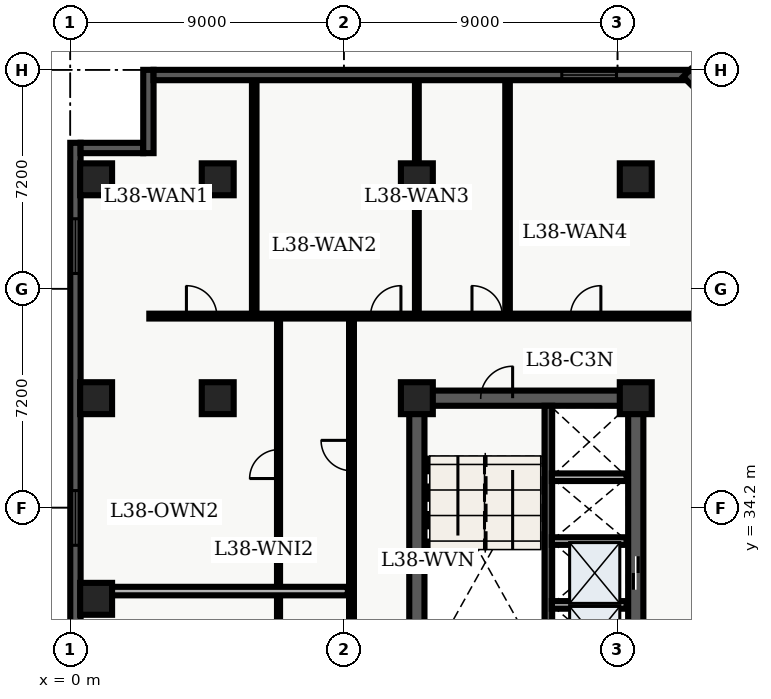
"""IFC4 building model, lengths in metres.
Left out: names, types, materials, properties, quantities, classifications, styles, units other than length and angle.
Written with IfcOpenShell. Run it as: python <this file> out.ifc"""

import sys

from ifc_helpers import new_model, entity, si_unit, converted_unit, direction, frame, origin_with_axes, origin_2d_with_axis, place, context, subcontext, project, spatial, polyline, rectangle, outline, extrude, element, fill, save


model = new_model("IFC4")
c1 = context("Model", 3, precision=1e-05, world=origin_with_axes(), true_north=direction((0.0, 1.0)))
c2 = subcontext(c1, "Body", "Model", "MODEL_VIEW")
j1 = project(units=[si_unit("LENGTHUNIT", "METRE"), converted_unit("PLANEANGLEUNIT", "DEGREE", entity("IfcPlaneAngleMeasure", 0.017), si_unit("PLANEANGLEUNIT", "RADIAN"), dimensions=[0, 0, 0, 0, 0, 0, 0])], contexts=[c1])
p1 = place(None, origin_with_axes())
s1 = spatial("IfcSite", under=j1, at=p1, CompositionType="ELEMENT")
p2 = place(p1, origin_with_axes())
s2 = spatial("IfcBuilding", under=s1, at=p2, CompositionType="ELEMENT")
p3 = place(p2, frame((0.0, 0.0, 156.3), z_axis=(0.0, 0.0, 1.0), x_axis=(1.0, 0.0, 0.0)))
s3 = spatial("IfcBuildingStorey", under=s2, at=p3, CompositionType="ELEMENT", Elevation=156.3)
p4 = place(p3, frame((11.4, 10.8, 0.0), z_axis=(0.0, 0.0, 1.0), x_axis=(0.0, 1.0, 0.0)))
e1 = element("IfcWall", 1, at=p4, inside=s3, PredefinedType="SHEAR", context=c2, shape_type="SweptSolid", body=[
    extrude(outline(polyline([(0.0, -0.25), (27.0, -0.25), (27.0, 0.25), (0.0, 0.25), (0.0, -0.25)])), origin_with_axes(), (0.0, 0.0, 1.0), 3.66),
])
p5 = place(p3, frame((11.4, 37.8, 0.0), z_axis=(0.0, 0.0, 1.0), x_axis=(1.0, 0.0, 0.0)))
e2 = element("IfcWall", 2, at=p5, inside=s3, PredefinedType="SHEAR", context=c2, shape_type="SweptSolid", body=[
    extrude(outline(polyline([(0.0, -0.25), (7.2, -0.25), (7.2, 0.25), (0.0, 0.25), (0.0, -0.25)])), origin_with_axes(), (0.0, 0.0, 1.0), 3.66),
])
p6 = place(p5, frame((2.625, 0.0, 0.0), z_axis=(0.0, 0.0, 1.0), x_axis=(1.0, 0.0, 0.0)))
e3 = element("IfcOpeningElement", 3, at=p6, cuts=e2, PredefinedType="OPENING", context=c2, shape_type="SweptSolid", body=[
    extrude(rectangle(XDim=1.05, YDim=0.52, at=origin_2d_with_axis()), origin_with_axes(), (0.0, 0.0, 1.0), 2.15),
])
p7 = place(p3, frame((18.6, 24.3, 0.0), z_axis=(0.0, 0.0, 1.0), x_axis=(0.0, 1.0, 0.0)))
e4 = element("IfcWall", 4, at=p7, inside=s3, PredefinedType="SHEAR", context=c2, shape_type="SweptSolid", body=[
    extrude(outline(polyline([(0.0, -0.25), (13.5, -0.25), (13.5, 0.25), (0.0, 0.25), (0.0, -0.25)])), origin_with_axes(), (0.0, 0.0, 1.0), 3.66),
])
p8 = place(p7, frame((5.65, 0.0, 0.0), z_axis=(0.0, 0.0, 1.0), x_axis=(1.0, 0.0, 0.0)))
e5 = element("IfcOpeningElement", 5, at=p8, cuts=e4, PredefinedType="OPENING", context=c2, shape_type="SweptSolid", body=[
    extrude(rectangle(XDim=1.1, YDim=0.52, at=origin_2d_with_axis()), origin_with_axes(), (0.0, 0.0, 1.0), 2.15),
])
p9 = place(p7, frame((7.75, 0.0, 0.0), z_axis=(0.0, 0.0, 1.0), x_axis=(1.0, 0.0, 0.0)))
e6 = element("IfcOpeningElement", 6, at=p9, cuts=e4, PredefinedType="OPENING", context=c2, shape_type="SweptSolid", body=[
    extrude(rectangle(XDim=1.1, YDim=0.52, at=origin_2d_with_axis()), origin_with_axes(), (0.0, 0.0, 1.0), 2.15),
])
p10 = place(p3, frame((15.725, 28.9, 0.0), z_axis=(0.0, 0.0, 1.0), x_axis=(0.0, 1.0, 0.0)))
e7 = element("IfcWall", 7, at=p10, inside=s3, PredefinedType="SHEAR", context=c2, shape_type="SweptSolid", body=[
    extrude(outline(polyline([(0.0, -0.125), (8.65, -0.125), (8.65, 0.125), (0.0, 0.125), (0.0, -0.125)])), origin_with_axes(), (0.0, 0.0, 1.0), 3.66),
])
for number, where, z_axis, x_axis in (
    (8, (11.4, 37.8, 0.0), (0.0, 0.0, 1.0), (1.0, 0.0, 0.0)),
    (9, (11.4, 45.0, 0.0), (0.0, 0.0, 1.0), (1.0, 0.0, 0.0)),
    (10, (18.6, 37.8, 0.0), (0.0, 0.0, 1.0), (1.0, 0.0, 0.0)),
    (11, (18.6, 45.0, 0.0), (0.0, 0.0, 1.0), (1.0, 0.0, 0.0)),
    (12, (4.85, 37.8, 0.0), (0.0, 0.0, 1.0), (1.0, 0.0, 0.0)),
    (13, (4.85, 45.0, 0.0), (0.0, 0.0, 1.0), (1.0, 0.0, 0.0)),
    (14, (0.85, 31.2, 0.0), (0.0, 0.0, 1.0), (1.0, 0.0, 0.0)),
    (15, (0.85, 37.8, 0.0), (0.0, 0.0, 1.0), (1.0, 0.0, 0.0)),
    (16, (0.85, 45.0, 0.0), (0.0, 0.0, 1.0), (1.0, 0.0, 0.0)),
):
    element("IfcColumn", number, at=place(p3, frame(where, z_axis=z_axis, x_axis=x_axis)), inside=s3, PredefinedType="COLUMN", context=c2, shape_type="SweptSolid", body=[
        extrude(rectangle(XDim=1.05, YDim=1.05, at=origin_2d_with_axis()), origin_with_axes(), (0.0, 0.0, 1.0), 3.9),
    ])
for number, where, z_axis, x_axis in (
    (17, (15.84, 31.0, 0.0), (0.0, 0.0, 1.0), (1.0, 0.0, 0.0)),
    (18, (15.84, 33.1, 0.0), (0.0, 0.0, 1.0), (1.0, 0.0, 0.0)),
    (19, (15.84, 35.2, 0.0), (0.0, 0.0, 1.0), (1.0, 0.0, 0.0)),
):
    element("IfcWall", number, at=place(p3, frame(where, z_axis=z_axis, x_axis=x_axis)), inside=s3, PredefinedType="SOLIDWALL", context=c2, shape_type="SweptSolid", body=[
        extrude(outline(polyline([(0.0, -0.125), (2.46, -0.125), (2.46, 0.125), (0.0, 0.125), (0.0, -0.125)])), origin_with_axes(), (0.0, 0.0, 1.0), 2.7),
    ])
p11 = place(p3, frame((2.6, 40.5, 0.0), z_axis=(0.0, 0.0, 1.0), x_axis=(1.0, 0.0, 0.0)))
e20 = element("IfcWall", 20, at=p11, inside=s3, PredefinedType="PARTITIONING", context=c2, shape_type="SweptSolid", body=[
    extrude(outline(polyline([(0.0, -0.08), (20.117, -0.08), (20.117, 0.08), (0.0, 0.08), (0.0, -0.08)])), origin_with_axes(), (0.0, 0.0, 1.0), 2.7),
])
p12 = place(p11, frame((1.72, 0.0, 0.0), z_axis=(0.0, 0.0, 1.0), x_axis=(1.0, 0.0, 0.0)))
e21 = element("IfcOpeningElement", 21, at=p12, cuts=e20, PredefinedType="OPENING", context=c2, shape_type="SweptSolid", body=[
    extrude(rectangle(XDim=1.0, YDim=0.18, at=origin_2d_with_axis()), origin_with_axes(), (0.0, 0.0, 1.0), 2.15),
])
p13 = place(p11, frame((7.776, 0.0, 0.0), z_axis=(0.0, 0.0, 1.0), x_axis=(1.0, 0.0, 0.0)))
e22 = element("IfcOpeningElement", 22, at=p13, cuts=e20, PredefinedType="OPENING", context=c2, shape_type="SweptSolid", body=[
    extrude(rectangle(XDim=1.0, YDim=0.18, at=origin_2d_with_axis()), origin_with_axes(), (0.0, 0.0, 1.0), 2.15),
])
p14 = place(p11, frame((11.113, 0.0, 0.0), z_axis=(0.0, 0.0, 1.0), x_axis=(1.0, 0.0, 0.0)))
e23 = element("IfcOpeningElement", 23, at=p14, cuts=e20, PredefinedType="OPENING", context=c2, shape_type="SweptSolid", body=[
    extrude(rectangle(XDim=1.0, YDim=0.18, at=origin_2d_with_axis()), origin_with_axes(), (0.0, 0.0, 1.0), 2.15),
])
p15 = place(p11, frame((14.352, 0.0, 0.0), z_axis=(0.0, 0.0, 1.0), x_axis=(1.0, 0.0, 0.0)))
e24 = element("IfcOpeningElement", 24, at=p15, cuts=e20, PredefinedType="OPENING", context=c2, shape_type="SweptSolid", body=[
    extrude(rectangle(XDim=1.0, YDim=0.18, at=origin_2d_with_axis()), origin_with_axes(), (0.0, 0.0, 1.0), 2.15),
])
p16 = place(p3, frame((9.25, 24.4, 0.0), z_axis=(0.0, 0.0, 1.0), x_axis=(0.0, 1.0, 0.0)))
e25 = element("IfcWall", 25, at=p16, inside=s3, PredefinedType="PARTITIONING", context=c2, shape_type="SweptSolid", body=[
    extrude(outline(polyline([(0.0, -0.08), (16.1, -0.08), (16.1, 0.08), (0.0, 0.08), (0.0, -0.08)])), origin_with_axes(), (0.0, 0.0, 1.0), 2.7),
])
p17 = place(p16, frame((3.567, 0.0, 0.0), z_axis=(0.0, 0.0, 1.0), x_axis=(1.0, 0.0, 0.0)))
e26 = element("IfcOpeningElement", 26, at=p17, cuts=e25, PredefinedType="OPENING", context=c2, shape_type="SweptSolid", body=[
    extrude(rectangle(XDim=1.0, YDim=0.18, at=origin_2d_with_axis()), origin_with_axes(), (0.0, 0.0, 1.0), 2.15),
])
p18 = place(p16, frame((11.512, 0.0, 0.0), z_axis=(0.0, 0.0, 1.0), x_axis=(1.0, 0.0, 0.0)))
e27 = element("IfcOpeningElement", 27, at=p18, cuts=e25, PredefinedType="OPENING", context=c2, shape_type="SweptSolid", body=[
    extrude(rectangle(XDim=1.0, YDim=0.18, at=origin_2d_with_axis()), origin_with_axes(), (0.0, 0.0, 1.0), 2.15),
])
p19 = place(p3, frame((6.85, 24.55, 0.0), z_axis=(0.0, 0.0, 1.0), x_axis=(0.0, 1.0, 0.0)))
e28 = element("IfcWall", 28, at=p19, inside=s3, PredefinedType="PARTITIONING", context=c2, shape_type="SweptSolid", body=[
    extrude(outline(polyline([(0.0, -0.05), (15.75, -0.05), (15.75, 0.05), (0.0, 0.05), (0.0, -0.05)])), origin_with_axes(), (0.0, 0.0, 1.0), 2.7),
])
p20 = place(p19, frame((3.417, 0.0, 0.0), z_axis=(0.0, 0.0, 1.0), x_axis=(1.0, 0.0, 0.0)))
e29 = element("IfcOpeningElement", 29, at=p20, cuts=e28, PredefinedType="OPENING", context=c2, shape_type="SweptSolid", body=[
    extrude(rectangle(XDim=0.95, YDim=0.12, at=origin_2d_with_axis()), origin_with_axes(), (0.0, 0.0, 1.0), 2.15),
])
p21 = place(p19, frame((11.082, 0.0, 0.0), z_axis=(0.0, 0.0, 1.0), x_axis=(1.0, 0.0, 0.0)))
e30 = element("IfcOpeningElement", 30, at=p21, cuts=e28, PredefinedType="OPENING", context=c2, shape_type="SweptSolid", body=[
    extrude(rectangle(XDim=0.95, YDim=0.12, at=origin_2d_with_axis()), origin_with_axes(), (0.0, 0.0, 1.0), 2.15),
])
p22 = place(p3, frame((0.335, 31.455, 0.0), z_axis=(0.0, 0.0, 1.0), x_axis=(1.0, 0.0, 0.0)))
e31 = element("IfcWall", 31, at=p22, inside=s3, PredefinedType="PARTITIONING", context=c2, shape_type="SweptSolid", body=[
    extrude(outline(polyline([(0.0, -0.14), (8.795, -0.14), (8.795, 0.14), (0.0, 0.14), (0.0, -0.14)])), origin_with_axes(), (0.0, 0.0, 1.0), 2.7),
])
p23 = place(p3, frame((6.051, 40.6, 0.0), z_axis=(0.0, 0.0, 1.0), x_axis=(0.0, 1.0, 0.0)))
e32 = element("IfcWall", 32, at=p23, inside=s3, PredefinedType="PARTITIONING", context=c2, shape_type="SweptSolid", body=[
    extrude(outline(polyline([(0.0, -0.075), (7.665, -0.075), (7.665, 0.075), (0.0, 0.075), (0.0, -0.075)])), origin_with_axes(), (0.0, 0.0, 1.0), 2.7),
])
p24 = place(p3, frame((11.4, 40.6, 0.0), z_axis=(0.0, 0.0, 1.0), x_axis=(0.0, 1.0, 0.0)))
e33 = element("IfcWall", 33, at=p24, inside=s3, PredefinedType="PARTITIONING", context=c2, shape_type="SweptSolid", body=[
    extrude(outline(polyline([(0.0, -0.062), (7.665, -0.062), (7.665, 0.062), (0.0, 0.062), (0.0, -0.062)])), origin_with_axes(), (0.0, 0.0, 1.0), 2.7),
])
p25 = place(p3, frame((14.383, 40.6, 0.0), z_axis=(0.0, 0.0, 1.0), x_axis=(0.0, 1.0, 0.0)))
e34 = element("IfcWall", 34, at=p25, inside=s3, PredefinedType="PARTITIONING", context=c2, shape_type="SweptSolid", body=[
    extrude(outline(polyline([(0.0, -0.075), (7.665, -0.075), (7.665, 0.075), (0.0, 0.075), (0.0, -0.075)])), origin_with_axes(), (0.0, 0.0, 1.0), 2.7),
])
p26 = place(p3, frame((0.17, 2.74, 0.0), z_axis=(0.0, 0.0, 1.0), x_axis=(0.0, 1.0, 0.0)))
e35 = element("IfcWall", 35, at=p26, inside=s3, PredefinedType="SOLIDWALL", context=c2, shape_type="SweptSolid", body=[
    extrude(outline(polyline([(0.0, -0.17), (43.46, -0.17), (43.46, 0.17), (0.0, 0.17), (0.0, -0.17)])), origin_with_axes(), (0.0, 0.0, 1.0), 3.66),
])
p27 = place(p26, frame((2.948, 0.0, 0.45), z_axis=(0.0, 0.0, 1.0), x_axis=(1.0, 0.0, 0.0)))
e36 = element("IfcOpeningElement", 36, at=p27, cuts=e35, PredefinedType="OPENING", context=c2, shape_type="SweptSolid", body=[
    extrude(rectangle(XDim=1.8, YDim=0.36, at=origin_2d_with_axis()), origin_with_axes(), (0.0, 0.0, 1.0), 2.1),
])
p28 = place(p26, frame((12.339, 0.0, 0.45), z_axis=(0.0, 0.0, 1.0), x_axis=(1.0, 0.0, 0.0)))
e37 = element("IfcOpeningElement", 37, at=p28, cuts=e35, PredefinedType="OPENING", context=c2, shape_type="SweptSolid", body=[
    extrude(rectangle(XDim=1.8, YDim=0.36, at=origin_2d_with_axis()), origin_with_axes(), (0.0, 0.0, 1.0), 2.1),
])
p29 = place(p26, frame((26.426, 0.0, 0.45), z_axis=(0.0, 0.0, 1.0), x_axis=(1.0, 0.0, 0.0)))
e38 = element("IfcOpeningElement", 38, at=p29, cuts=e35, PredefinedType="OPENING", context=c2, shape_type="SweptSolid", body=[
    extrude(rectangle(XDim=1.8, YDim=0.36, at=origin_2d_with_axis()), origin_with_axes(), (0.0, 0.0, 1.0), 2.1),
])
p30 = place(p26, frame((31.121, 0.0, 0.45), z_axis=(0.0, 0.0, 1.0), x_axis=(1.0, 0.0, 0.0)))
e39 = element("IfcOpeningElement", 39, at=p30, cuts=e35, PredefinedType="OPENING", context=c2, shape_type="SweptSolid", body=[
    extrude(rectangle(XDim=1.8, YDim=0.36, at=origin_2d_with_axis()), origin_with_axes(), (0.0, 0.0, 1.0), 2.1),
])
p31 = place(p26, frame((40.062, 0.0, 0.45), z_axis=(0.0, 0.0, 1.0), x_axis=(1.0, 0.0, 0.0)))
e40 = element("IfcOpeningElement", 40, at=p31, cuts=e35, PredefinedType="OPENING", context=c2, shape_type="SweptSolid", body=[
    extrude(rectangle(XDim=1.8, YDim=0.36, at=origin_2d_with_axis()), origin_with_axes(), (0.0, 0.0, 1.0), 2.1),
])
p32 = place(p3, frame((0.34, 46.03, 0.0), z_axis=(0.0, 0.0, 1.0), x_axis=(1.0, 0.0, 0.0)))
e41 = element("IfcWall", 41, at=p32, inside=s3, PredefinedType="SOLIDWALL", context=c2, shape_type="SweptSolid", body=[
    extrude(outline(polyline([(0.0, -0.17), (2.06, -0.17), (2.06, 0.17), (0.0, 0.17), (0.0, -0.17)])), origin_with_axes(), (0.0, 0.0, 1.0), 3.66),
])
p33 = place(p3, frame((2.57, 45.86, 0.0), z_axis=(0.0, 0.0, 1.0), x_axis=(0.0, 1.0, 0.0)))
e42 = element("IfcWall", 42, at=p33, inside=s3, PredefinedType="SOLIDWALL", context=c2, shape_type="SweptSolid", body=[
    extrude(outline(polyline([(0.0, -0.17), (2.74, -0.17), (2.74, 0.17), (0.0, 0.17), (0.0, -0.17)])), origin_with_axes(), (0.0, 0.0, 1.0), 3.66),
])
p34 = place(p3, frame((2.74, 48.43, 0.0), z_axis=(0.0, 0.0, 1.0), x_axis=(1.0, 0.0, 0.0)))
e43 = element("IfcWall", 43, at=p34, inside=s3, PredefinedType="SOLIDWALL", context=c2, shape_type="SweptSolid", body=[
    extrude(outline(polyline([(0.0, -0.17), (17.672, -0.17), (17.672, 0.17), (0.0, 0.17), (0.0, -0.17)])), origin_with_axes(), (0.0, 0.0, 1.0), 3.66),
])
p35 = place(p34, frame((14.327, 0.0, 0.45), z_axis=(0.0, 0.0, 1.0), x_axis=(1.0, 0.0, 0.0)))
e44 = element("IfcOpeningElement", 44, at=p35, cuts=e43, PredefinedType="OPENING", context=c2, shape_type="SweptSolid", body=[
    extrude(rectangle(XDim=1.8, YDim=0.36, at=origin_2d_with_axis()), origin_with_axes(), (0.0, 0.0, 1.0), 2.1),
])
p36 = place(p3, frame((20.278, 48.494, 0.0), z_axis=(0.0, 0.0, 1.0), x_axis=(0.707107, -0.707107, 0.0)))
e45 = element("IfcWall", 45, at=p36, inside=s3, PredefinedType="SOLIDWALL", context=c2, shape_type="SweptSolid", body=[
    extrude(outline(polyline([(0.0, -0.17), (3.753, -0.17), (3.753, 0.17), (0.0, 0.17), (0.0, -0.17)])), origin_with_axes(), (0.0, 0.0, 1.0), 3.66),
])
p37 = place(p7, frame((7.75, 0.0, 0.0), z_axis=(0.0, 0.0, 1.0), x_axis=(1.0, 0.0, 0.0)))
e46 = element("IfcDoor", 46, at=p37, inside=s3, OperationType="SLIDING_TO_RIGHT", PredefinedType="DOOR", context=c2, shape_type="SweptSolid", body=[
    extrude(rectangle(XDim=1.1, YDim=0.09, at=origin_2d_with_axis()), origin_with_axes(), (0.0, 0.0, 1.0), 2.15),
])
fill(e6, e46)
p38 = place(p5, frame((2.625, 0.0, 0.0), z_axis=(0.0, 0.0, 1.0), x_axis=(1.0, 0.0, 0.0)))
e47 = element("IfcDoor", 47, at=p38, inside=s3, OperationType="SINGLE_SWING_RIGHT", PredefinedType="DOOR", context=c2, shape_type="SweptSolid", body=[
    extrude(rectangle(XDim=1.05, YDim=0.09, at=origin_2d_with_axis()), origin_with_axes(), (0.0, 0.0, 1.0), 2.15),
])
fill(e3, e47)
p39 = place(p19, frame((11.082, 0.0, 0.0), z_axis=(0.0, 0.0, 1.0), x_axis=(1.0, 0.0, 0.0)))
e48 = element("IfcDoor", 48, at=p39, inside=s3, OperationType="SINGLE_SWING_LEFT", PredefinedType="DOOR", context=c2, shape_type="SweptSolid", body=[
    extrude(rectangle(XDim=0.95, YDim=0.06, at=origin_2d_with_axis()), origin_with_axes(), (0.0, 0.0, 1.0), 2.15),
])
fill(e30, e48)
p40 = place(p16, frame((11.512, 0.0, 0.0), z_axis=(0.0, 0.0, 1.0), x_axis=(1.0, 0.0, 0.0)))
e49 = element("IfcDoor", 49, at=p40, inside=s3, OperationType="SINGLE_SWING_RIGHT", PredefinedType="DOOR", context=c2, shape_type="SweptSolid", body=[
    extrude(rectangle(XDim=1.0, YDim=0.09, at=origin_2d_with_axis()), origin_with_axes(), (0.0, 0.0, 1.0), 2.15),
])
fill(e27, e49)
p41 = place(p11, frame((1.72, 0.0, 0.0), z_axis=(0.0, 0.0, 1.0), x_axis=(1.0, 0.0, 0.0)))
e50 = element("IfcDoor", 50, at=p41, inside=s3, OperationType="SINGLE_SWING_LEFT", PredefinedType="DOOR", context=c2, shape_type="SweptSolid", body=[
    extrude(rectangle(XDim=1.0, YDim=0.09, at=origin_2d_with_axis()), origin_with_axes(), (0.0, 0.0, 1.0), 2.15),
])
fill(e21, e50)
p42 = place(p11, frame((7.776, 0.0, 0.0), z_axis=(0.0, 0.0, 1.0), x_axis=(1.0, 0.0, 0.0)))
e51 = element("IfcDoor", 51, at=p42, inside=s3, OperationType="SINGLE_SWING_RIGHT", PredefinedType="DOOR", context=c2, shape_type="SweptSolid", body=[
    extrude(rectangle(XDim=1.0, YDim=0.09, at=origin_2d_with_axis()), origin_with_axes(), (0.0, 0.0, 1.0), 2.15),
])
fill(e22, e51)
p43 = place(p11, frame((11.113, 0.0, 0.0), z_axis=(0.0, 0.0, 1.0), x_axis=(1.0, 0.0, 0.0)))
e52 = element("IfcDoor", 52, at=p43, inside=s3, OperationType="SINGLE_SWING_LEFT", PredefinedType="DOOR", context=c2, shape_type="SweptSolid", body=[
    extrude(rectangle(XDim=1.0, YDim=0.09, at=origin_2d_with_axis()), origin_with_axes(), (0.0, 0.0, 1.0), 2.15),
])
fill(e23, e52)
p44 = place(p11, frame((14.352, 0.0, 0.0), z_axis=(0.0, 0.0, 1.0), x_axis=(1.0, 0.0, 0.0)))
e53 = element("IfcDoor", 53, at=p44, inside=s3, OperationType="SINGLE_SWING_RIGHT", PredefinedType="DOOR", context=c2, shape_type="SweptSolid", body=[
    extrude(rectangle(XDim=1.0, YDim=0.09, at=origin_2d_with_axis()), origin_with_axes(), (0.0, 0.0, 1.0), 2.15),
])
fill(e24, e53)
p45 = place(p26, frame((31.121, 0.0, 0.45), z_axis=(0.0, 0.0, 1.0), x_axis=(1.0, 0.0, 0.0)))
e54 = element("IfcWindow", 54, at=p45, inside=s3, PredefinedType="WINDOW", context=c2, shape_type="SweptSolid", body=[
    extrude(rectangle(XDim=1.8, YDim=0.09, at=origin_2d_with_axis()), origin_with_axes(), (0.0, 0.0, 1.0), 2.1),
])
fill(e39, e54)
p46 = place(p26, frame((40.062, 0.0, 0.45), z_axis=(0.0, 0.0, 1.0), x_axis=(1.0, 0.0, 0.0)))
e55 = element("IfcWindow", 55, at=p46, inside=s3, PredefinedType="WINDOW", context=c2, shape_type="SweptSolid", body=[
    extrude(rectangle(XDim=1.8, YDim=0.09, at=origin_2d_with_axis()), origin_with_axes(), (0.0, 0.0, 1.0), 2.1),
])
fill(e40, e55)
p47 = place(p34, frame((14.327, 0.0, 0.45), z_axis=(0.0, 0.0, 1.0), x_axis=(1.0, 0.0, 0.0)))
e56 = element("IfcWindow", 56, at=p47, inside=s3, PredefinedType="WINDOW", context=c2, shape_type="SweptSolid", body=[
    extrude(rectangle(XDim=1.8, YDim=0.09, at=origin_2d_with_axis()), origin_with_axes(), (0.0, 0.0, 1.0), 2.1),
])
fill(e44, e56)
save(model, sys.argv[1])
